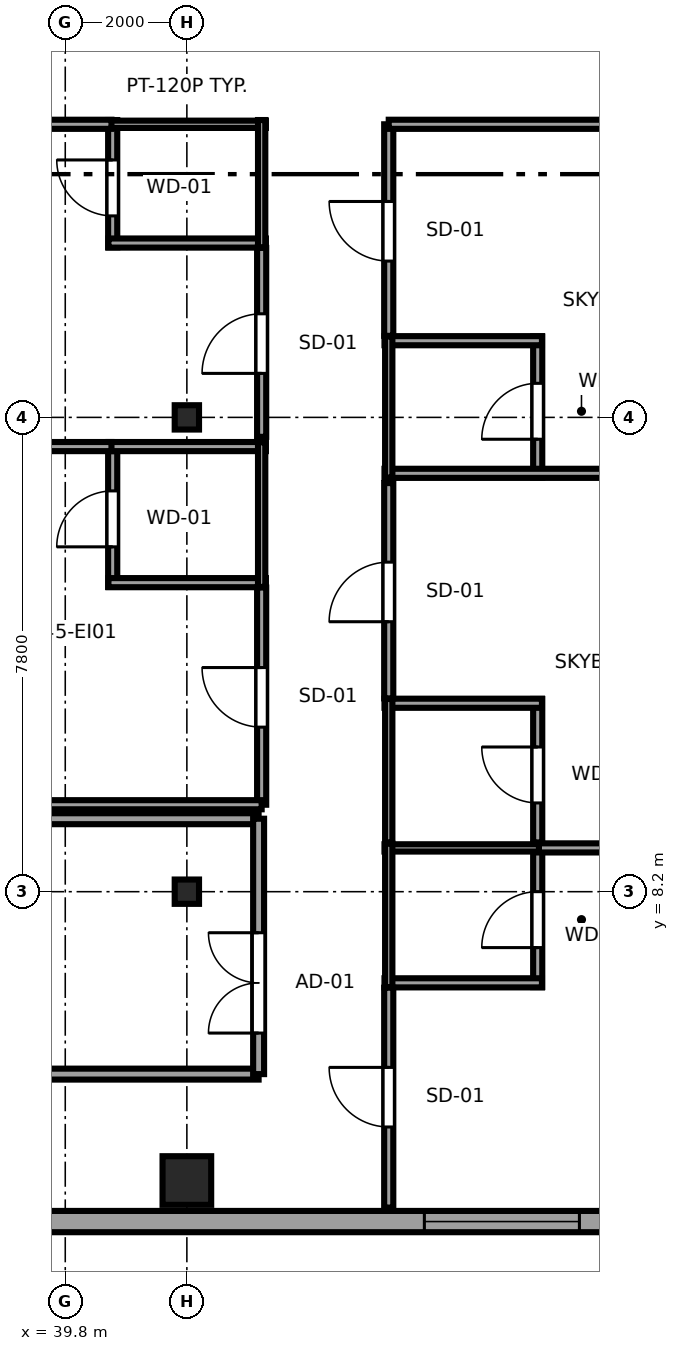
"""IFC4 building model, lengths in metres.
Left out: names, types, materials, properties, quantities, classifications, styles, units other than length and angle.
Written with IfcOpenShell. Run it as: python <this file> out.ifc"""

import sys

from ifc_helpers import new_model, si_unit, direction, frame, frame_2d, origin, origin_2d, place, context, subcontext, project, spatial, rectangle, i_section, extrude, source, transform, mapped, element, fill, save


model = new_model("IFC4")
c1 = context("Model", 3, precision=1e-05, world=origin(), true_north=direction((0.0, 1.0)))
c2 = subcontext(c1, "Body", "Model", "MODEL_VIEW")
j1 = project(units=[si_unit("LENGTHUNIT", "METRE"), si_unit("PLANEANGLEUNIT", "RADIAN")], contexts=[c1])
p1 = place(None, origin())
s1 = spatial("IfcSite", under=j1, at=p1, CompositionType="ELEMENT")
p2 = place(p1, origin())
s2 = spatial("IfcBuilding", under=s1, at=p2, CompositionType="ELEMENT")
p3 = place(p2, frame((0.0, 0.0, 171.9)))
s3 = spatial("IfcBuildingStorey", under=s2, at=p3, CompositionType="ELEMENT", Elevation=171.9)
m1 = source(origin(), c2, "Body", "SweptSolid", [
    extrude(rectangle(XDim=0.8, YDim=0.8, at=origin_2d()), origin(), (0.0, 0.0, 1.0), 3.55),
])
p4 = place(p3, frame((41.8, 3.45, 0.0), z_axis=(0.0, 0.0, 1.0), x_axis=(1.0, 0.0, 0.0)))
e1 = element("IfcColumn", 1, at=p4, inside=s3, PredefinedType="COLUMN", context=c2, shape_type="MappedRepresentation", body=[
    mapped(m1, transform((0.0, 0.0, 0.0), x_axis=(1.0, 0.0, 0.0), y_axis=(0.0, 1.0, 0.0), z_axis=(0.0, 0.0, 1.0), scale=1.0)),
])
m2 = source(origin(), c2, "Body", "SweptSolid", [
    extrude(i_section(OverallWidth=0.4, OverallDepth=0.4, WebThickness=0.02, FlangeThickness=0.035, at=origin_2d()), origin(), (0.0, 0.0, 1.0), 3.55),
])
for number, where, z_axis, x_axis in (
    (2, (41.8, 8.2, 0.0), (0.0, 0.0, 1.0), (1.0, 0.0, 0.0)),
    (3, (41.8, 16.0, 0.0), (0.0, 0.0, 1.0), (1.0, 0.0, 0.0)),
):
    element("IfcColumn", number, at=place(p3, frame(where, z_axis=z_axis, x_axis=x_axis)), inside=s3, PredefinedType="COLUMN", context=c2, shape_type="MappedRepresentation", body=[
        mapped(m2, transform((0.0, 0.0, 0.0), x_axis=(1.0, 0.0, 0.0), y_axis=(0.0, 1.0, 0.0), z_axis=(0.0, 0.0, 1.0), scale=1.0)),
    ])
p5 = place(p3, frame((34.375, 2.775, 0.0), z_axis=(0.0, 0.0, 1.0), x_axis=(1.0, 0.0, 0.0)))
e4 = element("IfcWall", 4, at=p5, inside=s3, PredefinedType="SOLIDWALL", context=c2, shape_type="SweptSolid", body=[
    extrude(rectangle(XDim=15.608, YDim=0.35, at=frame_2d((7.804, 0.0))), origin(), (0.0, 0.0, 1.0), 3.37),
])
p6 = place(p5, frame((1.726, 0.0, 0.68)))
e5 = element("IfcOpeningElement", 5, at=p6, cuts=e4, PredefinedType="OPENING", context=c2, shape_type="SweptSolid", body=[
    extrude(rectangle(XDim=2.55, YDim=1.92, at=frame_2d((1.275, 0.96))), frame((0.0, 0.185, 0.0), z_axis=(0.0, -1.0, 0.0), x_axis=(1.0, 0.0, 0.0)), (0.0, 0.0, 1.0), 0.37),
])
p7 = place(p5, frame((11.331, 0.0, 0.68)))
e6 = element("IfcOpeningElement", 6, at=p7, cuts=e4, PredefinedType="OPENING", context=c2, shape_type="SweptSolid", body=[
    extrude(rectangle(XDim=2.55, YDim=1.92, at=frame_2d((1.275, 0.96))), frame((0.0, 0.185, 0.0), z_axis=(0.0, -1.0, 0.0), x_axis=(1.0, 0.0, 0.0)), (0.0, 0.0, 1.0), 0.37),
])
p8 = place(p3, frame((40.58, 13.212, 0.0), z_axis=(0.0, 0.0, 1.0), x_axis=(0.0, 1.0, 0.0)))
e7 = element("IfcWall", 7, at=p8, inside=s3, PredefinedType="PARTITIONING", context=c2, shape_type="SweptSolid", body=[
    extrude(rectangle(XDim=2.378, YDim=0.15, at=frame_2d((1.189, 0.0))), origin(), (0.0, 0.0, 1.0), 3.37),
])
p9 = place(p8, frame((0.659, 0.0, 0.0)))
e8 = element("IfcOpeningElement", 8, at=p9, cuts=e7, PredefinedType="OPENING", context=c2, shape_type="SweptSolid", body=[
    extrude(rectangle(XDim=0.92, YDim=2.01, at=frame_2d((0.46, 1.005))), frame((0.0, 0.085, 0.0), z_axis=(0.0, -1.0, 0.0), x_axis=(1.0, 0.0, 0.0)), (0.0, 0.0, 1.0), 0.17),
])
for number, where, z_axis, x_axis in (
    (9, (40.51, 13.282, 0.0), (0.0, 0.0, 1.0), (1.0, 0.0, 0.0)),
    (10, (40.51, 15.52, 0.0), (0.0, 0.0, 1.0), (1.0, 0.0, 0.0)),
):
    element("IfcWall", number, at=place(p3, frame(where, z_axis=z_axis, x_axis=x_axis)), inside=s3, PredefinedType="PARTITIONING", context=c2, shape_type="SweptSolid", body=[
        extrude(rectangle(XDim=2.59, YDim=0.15, at=frame_2d((1.295, 0.0))), origin(), (0.0, 0.0, 1.0), 3.37),
    ])
p10 = place(p3, frame((43.03, 13.212, 0.0), z_axis=(0.0, 0.0, 1.0), x_axis=(0.0, 1.0, 0.0)))
e11 = element("IfcWall", 11, at=p10, inside=s3, PredefinedType="PLUMBINGWALL", context=c2, shape_type="SweptSolid", body=[
    extrude(rectangle(XDim=2.378, YDim=0.12, at=frame_2d((1.189, 0.0))), origin(), (0.0, 0.0, 1.0), 3.37),
])
p11 = place(p3, frame((40.58, 18.797, 0.0), z_axis=(0.0, 0.0, 1.0), x_axis=(0.0, 1.0, 0.0)))
e12 = element("IfcWall", 12, at=p11, inside=s3, PredefinedType="PARTITIONING", context=c2, shape_type="SweptSolid", body=[
    extrude(rectangle(XDim=2.093, YDim=0.15, at=frame_2d((1.046, 0.0))), origin(), (0.0, 0.0, 1.0), 3.37),
])
p12 = place(p11, frame((0.517, 0.0, 0.0)))
e13 = element("IfcOpeningElement", 13, at=p12, cuts=e12, PredefinedType="OPENING", context=c2, shape_type="SweptSolid", body=[
    extrude(rectangle(XDim=0.92, YDim=2.01, at=frame_2d((0.46, 1.005))), frame((0.0, 0.085, 0.0), z_axis=(0.0, -1.0, 0.0), x_axis=(1.0, 0.0, 0.0)), (0.0, 0.0, 1.0), 0.17),
])
p13 = place(p3, frame((40.51, 18.867, 0.0), z_axis=(0.0, 0.0, 1.0), x_axis=(1.0, 0.0, 0.0)))
e14 = element("IfcWall", 14, at=p13, inside=s3, PredefinedType="PARTITIONING", context=c2, shape_type="SweptSolid", body=[
    extrude(rectangle(XDim=2.59, YDim=0.15, at=frame_2d((1.295, 0.0))), origin(), (0.0, 0.0, 1.0), 3.37),
])
p14 = place(p3, frame((40.51, 20.82, 0.0), z_axis=(0.0, 0.0, 1.0), x_axis=(1.0, 0.0, 0.0)))
e15 = element("IfcWall", 15, at=p14, inside=s3, PredefinedType="PLUMBINGWALL", context=c2, shape_type="SweptSolid", body=[
    extrude(rectangle(XDim=2.59, YDim=0.12, at=frame_2d((1.295, 0.0))), origin(), (0.0, 0.0, 1.0), 3.37),
])
p15 = place(p3, frame((43.03, 18.797, 0.0), z_axis=(0.0, 0.0, 1.0), x_axis=(0.0, 1.0, 0.0)))
e16 = element("IfcWall", 16, at=p15, inside=s3, PredefinedType="PLUMBINGWALL", context=c2, shape_type="SweptSolid", body=[
    extrude(rectangle(XDim=2.093, YDim=0.12, at=frame_2d((1.046, 0.0))), origin(), (0.0, 0.0, 1.0), 3.37),
])
p16 = place(p3, frame((47.57, 6.631, 0.0), z_axis=(0.0, 0.0, 1.0), x_axis=(0.0, 1.0, 0.0)))
e17 = element("IfcWall", 17, at=p16, inside=s3, PredefinedType="PARTITIONING", context=c2, shape_type="SweptSolid", body=[
    extrude(rectangle(XDim=2.359, YDim=0.15, at=frame_2d((1.179, 0.0))), origin(), (0.0, 0.0, 1.0), 3.37),
])
p17 = place(p16, frame((0.649, 0.0, 0.0)))
e18 = element("IfcOpeningElement", 18, at=p17, cuts=e17, PredefinedType="OPENING", context=c2, shape_type="SweptSolid", body=[
    extrude(rectangle(XDim=0.92, YDim=2.01, at=frame_2d((0.46, 1.005))), frame((0.0, 0.085, 0.0), z_axis=(0.0, -1.0, 0.0), x_axis=(1.0, 0.0, 0.0)), (0.0, 0.0, 1.0), 0.17),
])
p18 = place(p3, frame((45.05, 6.701, 0.0), z_axis=(0.0, 0.0, 1.0), x_axis=(1.0, 0.0, 0.0)))
e19 = element("IfcWall", 19, at=p18, inside=s3, PredefinedType="PARTITIONING", context=c2, shape_type="SweptSolid", body=[
    extrude(rectangle(XDim=2.59, YDim=0.15, at=frame_2d((1.295, 0.0))), origin(), (0.0, 0.0, 1.0), 3.37),
])
p19 = place(p3, frame((45.05, 8.92, 0.0), z_axis=(0.0, 0.0, 1.0), x_axis=(1.0, 0.0, 0.0)))
e20 = element("IfcWall", 20, at=p19, inside=s3, PredefinedType="PLUMBINGWALL", context=c2, shape_type="SweptSolid", body=[
    extrude(rectangle(XDim=2.59, YDim=0.12, at=frame_2d((1.295, 0.0))), origin(), (0.0, 0.0, 1.0), 3.37),
])
p20 = place(p3, frame((45.12, 6.631, 0.0), z_axis=(0.0, 0.0, 1.0), x_axis=(0.0, 1.0, 0.0)))
e21 = element("IfcWall", 21, at=p20, inside=s3, PredefinedType="PLUMBINGWALL", context=c2, shape_type="SweptSolid", body=[
    extrude(rectangle(XDim=2.359, YDim=0.12, at=frame_2d((1.179, 0.0))), origin(), (0.0, 0.0, 1.0), 3.37),
])
p21 = place(p3, frame((47.57, 9.01, 0.0), z_axis=(0.0, 0.0, 1.0), x_axis=(0.0, 1.0, 0.0)))
e22 = element("IfcWall", 22, at=p21, inside=s3, PredefinedType="PARTITIONING", context=c2, shape_type="SweptSolid", body=[
    extrude(rectangle(XDim=2.359, YDim=0.15, at=frame_2d((1.179, 0.0))), origin(), (0.0, 0.0, 1.0), 3.37),
])
p22 = place(p21, frame((0.649, 0.0, 0.0)))
e23 = element("IfcOpeningElement", 23, at=p22, cuts=e22, PredefinedType="OPENING", context=c2, shape_type="SweptSolid", body=[
    extrude(rectangle(XDim=0.92, YDim=2.01, at=frame_2d((0.46, 1.005))), frame((0.0, 0.085, 0.0), z_axis=(0.0, -1.0, 0.0), x_axis=(1.0, 0.0, 0.0)), (0.0, 0.0, 1.0), 0.17),
])
p23 = place(p3, frame((45.05, 11.299, 0.0), z_axis=(0.0, 0.0, 1.0), x_axis=(1.0, 0.0, 0.0)))
e24 = element("IfcWall", 24, at=p23, inside=s3, PredefinedType="PARTITIONING", context=c2, shape_type="SweptSolid", body=[
    extrude(rectangle(XDim=2.59, YDim=0.15, at=frame_2d((1.295, 0.0))), origin(), (0.0, 0.0, 1.0), 3.37),
])
p24 = place(p3, frame((45.12, 9.01, 0.0), z_axis=(0.0, 0.0, 1.0), x_axis=(0.0, 1.0, 0.0)))
e25 = element("IfcWall", 25, at=p24, inside=s3, PredefinedType="PLUMBINGWALL", context=c2, shape_type="SweptSolid", body=[
    extrude(rectangle(XDim=2.359, YDim=0.12, at=frame_2d((1.179, 0.0))), origin(), (0.0, 0.0, 1.0), 3.37),
])
p25 = place(p3, frame((47.57, 15.01, 0.0), z_axis=(0.0, 0.0, 1.0), x_axis=(0.0, 1.0, 0.0)))
e26 = element("IfcWall", 26, at=p25, inside=s3, PredefinedType="PARTITIONING", context=c2, shape_type="SweptSolid", body=[
    extrude(rectangle(XDim=2.321, YDim=0.15, at=frame_2d((1.161, 0.0))), origin(), (0.0, 0.0, 1.0), 3.37),
])
p26 = place(p25, frame((0.631, 0.0, 0.0)))
e27 = element("IfcOpeningElement", 27, at=p26, cuts=e26, PredefinedType="OPENING", context=c2, shape_type="SweptSolid", body=[
    extrude(rectangle(XDim=0.92, YDim=2.01, at=frame_2d((0.46, 1.005))), frame((0.0, 0.085, 0.0), z_axis=(0.0, -1.0, 0.0), x_axis=(1.0, 0.0, 0.0)), (0.0, 0.0, 1.0), 0.17),
])
p27 = place(p3, frame((45.05, 15.08, 0.0), z_axis=(0.0, 0.0, 1.0), x_axis=(1.0, 0.0, 0.0)))
e28 = element("IfcWall", 28, at=p27, inside=s3, PredefinedType="PARTITIONING", context=c2, shape_type="SweptSolid", body=[
    extrude(rectangle(XDim=9.05, YDim=0.15, at=frame_2d((4.525, 0.0))), origin(), (0.0, 0.0, 1.0), 3.37),
])
p28 = place(p3, frame((45.05, 17.261, 0.0), z_axis=(0.0, 0.0, 1.0), x_axis=(1.0, 0.0, 0.0)))
e29 = element("IfcWall", 29, at=p28, inside=s3, PredefinedType="PARTITIONING", context=c2, shape_type="SweptSolid", body=[
    extrude(rectangle(XDim=2.59, YDim=0.15, at=frame_2d((1.295, 0.0))), origin(), (0.0, 0.0, 1.0), 3.37),
])
p29 = place(p3, frame((45.12, 15.01, 0.0), z_axis=(0.0, 0.0, 1.0), x_axis=(0.0, 1.0, 0.0)))
e30 = element("IfcWall", 30, at=p29, inside=s3, PredefinedType="PLUMBINGWALL", context=c2, shape_type="SweptSolid", body=[
    extrude(rectangle(XDim=2.321, YDim=0.12, at=frame_2d((1.161, 0.0))), origin(), (0.0, 0.0, 1.0), 3.37),
])
p30 = place(p3, frame((43.03, 9.63, 0.0), z_axis=(0.0, 0.0, 1.0), x_axis=(0.0, 1.0, 0.0)))
e31 = element("IfcWall", 31, at=p30, inside=s3, PredefinedType="PARTITIONING", context=c2, shape_type="SweptSolid", body=[
    extrude(rectangle(XDim=3.572, YDim=0.15, at=frame_2d((1.786, 0.0))), origin(), (0.0, 0.0, 1.0), 3.37),
])
p31 = place(p30, frame((1.276, 0.0, 0.0)))
e32 = element("IfcOpeningElement", 32, at=p31, cuts=e31, PredefinedType="OPENING", context=c2, shape_type="SweptSolid", body=[
    extrude(rectangle(XDim=0.98, YDim=2.12, at=frame_2d((0.49, 1.06))), frame((0.0, 0.085, 0.0), z_axis=(0.0, -1.0, 0.0), x_axis=(1.0, 0.0, 0.0)), (0.0, 0.0, 1.0), 0.17),
])
p32 = place(p3, frame((34.65, 9.63, 0.0), z_axis=(0.0, 0.0, 1.0), x_axis=(1.0, 0.0, 0.0)))
e33 = element("IfcWall", 33, at=p32, inside=s3, PredefinedType="PARTITIONING", context=c2, shape_type="SweptSolid", body=[
    extrude(rectangle(XDim=8.38, YDim=0.15, at=frame_2d((4.19, 0.0))), origin(), (0.0, 0.0, 1.0), 3.37),
])
p33 = place(p3, frame((34.65, 15.52, 0.0), z_axis=(0.0, 0.0, 1.0), x_axis=(1.0, 0.0, 0.0)))
e34 = element("IfcWall", 34, at=p33, inside=s3, PredefinedType="PARTITIONING", context=c2, shape_type="SweptSolid", body=[
    extrude(rectangle(XDim=5.91, YDim=0.15, at=frame_2d((2.955, 0.0))), origin(), (0.0, 0.0, 1.0), 3.37),
])
p34 = place(p3, frame((43.03, 15.68, 0.0), z_axis=(0.0, 0.0, 1.0), x_axis=(0.0, 1.0, 0.0)))
e35 = element("IfcWall", 35, at=p34, inside=s3, PredefinedType="PARTITIONING", context=c2, shape_type="SweptSolid", body=[
    extrude(rectangle(XDim=3.107, YDim=0.15, at=frame_2d((1.554, 0.0))), origin(), (0.0, 0.0, 1.0), 3.37),
])
p35 = place(p34, frame((1.043, 0.0, 0.0)))
e36 = element("IfcOpeningElement", 36, at=p35, cuts=e35, PredefinedType="OPENING", context=c2, shape_type="SweptSolid", body=[
    extrude(rectangle(XDim=0.98, YDim=2.12, at=frame_2d((0.49, 1.06))), frame((0.0, 0.085, 0.0), z_axis=(0.0, -1.0, 0.0), x_axis=(1.0, 0.0, 0.0)), (0.0, 0.0, 1.0), 0.17),
])
p36 = place(p3, frame((34.65, 20.82, 0.0), z_axis=(0.0, 0.0, 1.0), x_axis=(1.0, 0.0, 0.0)))
e37 = element("IfcWall", 37, at=p36, inside=s3, PredefinedType="PARTITIONING", context=c2, shape_type="SweptSolid", body=[
    extrude(rectangle(XDim=5.91, YDim=0.15, at=frame_2d((2.955, 0.0))), origin(), (0.0, 0.0, 1.0), 3.37),
])
p37 = place(p3, frame((45.12, 3.005, 0.0), z_axis=(0.0, 0.0, 1.0), x_axis=(0.0, 1.0, 0.0)))
e38 = element("IfcWall", 38, at=p37, inside=s3, PredefinedType="PARTITIONING", context=c2, shape_type="SweptSolid", body=[
    extrude(rectangle(XDim=3.616, YDim=0.15, at=frame_2d((1.808, 0.0))), origin(), (0.0, 0.0, 1.0), 3.37),
])
p38 = place(p37, frame((1.325, 0.0, 0.0)))
e39 = element("IfcOpeningElement", 39, at=p38, cuts=e38, PredefinedType="OPENING", context=c2, shape_type="SweptSolid", body=[
    extrude(rectangle(XDim=0.98, YDim=2.12, at=frame_2d((0.49, 1.06))), frame((0.0, 0.085, 0.0), z_axis=(0.0, -1.0, 0.0), x_axis=(1.0, 0.0, 0.0)), (0.0, 0.0, 1.0), 0.17),
])
p39 = place(p3, frame((47.59, 8.92, 0.0), z_axis=(0.0, 0.0, 1.0), x_axis=(1.0, 0.0, 0.0)))
e40 = element("IfcWall", 40, at=p39, inside=s3, PredefinedType="PARTITIONING", context=c2, shape_type="SweptSolid", body=[
    extrude(rectangle(XDim=6.51, YDim=0.15, at=frame_2d((3.255, 0.0))), origin(), (0.0, 0.0, 1.0), 3.37),
])
p40 = place(p3, frame((45.12, 11.379, 0.0), z_axis=(0.0, 0.0, 1.0), x_axis=(0.0, 1.0, 0.0)))
e41 = element("IfcWall", 41, at=p40, inside=s3, PredefinedType="PARTITIONING", context=c2, shape_type="SweptSolid", body=[
    extrude(rectangle(XDim=3.541, YDim=0.15, at=frame_2d((1.771, 0.0))), origin(), (0.0, 0.0, 1.0), 3.37),
])
p41 = place(p40, frame((1.26, 0.0, 0.0)))
e42 = element("IfcOpeningElement", 42, at=p41, cuts=e41, PredefinedType="OPENING", context=c2, shape_type="SweptSolid", body=[
    extrude(rectangle(XDim=0.98, YDim=2.12, at=frame_2d((0.49, 1.06))), frame((0.0, 0.085, 0.0), z_axis=(0.0, -1.0, 0.0), x_axis=(1.0, 0.0, 0.0)), (0.0, 0.0, 1.0), 0.17),
])
p42 = place(p3, frame((45.12, 17.341, 0.0), z_axis=(0.0, 0.0, 1.0), x_axis=(0.0, 1.0, 0.0)))
e43 = element("IfcWall", 43, at=p42, inside=s3, PredefinedType="PARTITIONING", context=c2, shape_type="SweptSolid", body=[
    extrude(rectangle(XDim=3.479, YDim=0.15, at=frame_2d((1.74, 0.0))), origin(), (0.0, 0.0, 1.0), 3.37),
])
p43 = place(p42, frame((1.229, 0.0, 0.0)))
e44 = element("IfcOpeningElement", 44, at=p43, cuts=e43, PredefinedType="OPENING", context=c2, shape_type="SweptSolid", body=[
    extrude(rectangle(XDim=0.98, YDim=2.12, at=frame_2d((0.49, 1.06))), frame((0.0, 0.085, 0.0), z_axis=(0.0, -1.0, 0.0), x_axis=(1.0, 0.0, 0.0)), (0.0, 0.0, 1.0), 0.17),
])
p44 = place(p3, frame((45.12, 20.82, 0.0), z_axis=(0.0, 0.0, 1.0), x_axis=(1.0, 0.0, 0.0)))
e45 = element("IfcWall", 45, at=p44, inside=s3, PredefinedType="PARTITIONING", context=c2, shape_type="SweptSolid", body=[
    extrude(rectangle(XDim=8.98, YDim=0.15, at=frame_2d((4.49, 0.0))), origin(), (0.0, 0.0, 1.0), 3.37),
])
for number, where, z_axis, x_axis in (
    (46, (14.47, 5.2, 0.0), (0.0, 0.0, 1.0), (1.0, 0.0, 0.0)),
    (47, (14.47, 9.4, 0.0), (0.0, 0.0, 1.0), (1.0, 0.0, 0.0)),
):
    element("IfcWall", number, at=place(p3, frame(where, z_axis=z_axis, x_axis=x_axis)), inside=s3, PredefinedType="PARTITIONING", context=c2, shape_type="SweptSolid", body=[
        extrude(rectangle(XDim=28.51, YDim=0.18, at=frame_2d((14.255, 0.0))), origin(), (0.0, 0.0, 1.0), 3.37),
    ])
p45 = place(p3, frame((42.98, 5.2, 0.0), z_axis=(0.0, 0.0, 1.0), x_axis=(0.0, 1.0, 0.0)))
e48 = element("IfcWall", 48, at=p45, inside=s3, PredefinedType="PARTITIONING", context=c2, shape_type="SweptSolid", body=[
    extrude(rectangle(XDim=4.2, YDim=0.18, at=frame_2d((2.1, 0.0))), origin(), (0.0, 0.0, 1.0), 3.37),
])
p46 = place(p45, frame((0.675, 0.0, 0.0)))
e49 = element("IfcOpeningElement", 49, at=p46, cuts=e48, PredefinedType="OPENING", context=c2, shape_type="SweptSolid", body=[
    extrude(rectangle(XDim=1.65, YDim=2.15, at=frame_2d((0.825, 1.075))), frame((0.0, 0.1, 0.0), z_axis=(0.0, -1.0, 0.0), x_axis=(1.0, 0.0, 0.0)), (0.0, 0.0, 1.0), 0.2),
])
m3 = source(origin(), c2, "Body", "SweptSolid", [
    extrude(rectangle(XDim=2.55, YDim=1.92, at=frame_2d((1.275, 0.96))), frame((0.0, 0.09, 0.0), z_axis=(0.0, -1.0, 0.0), x_axis=(1.0, 0.0, 0.0)), (0.0, 0.0, 1.0), 0.06),
])
p47 = place(p7, origin())
e50 = element("IfcWindow", 50, at=p47, inside=s3, PartitioningType="TRIPLE_PANEL_HORIZONTAL", PredefinedType="WINDOW", context=c2, shape_type="MappedRepresentation", body=[
    mapped(m3, transform((0.0, 0.0, 0.0), x_axis=(1.0, 0.0, 0.0), y_axis=(0.0, 1.0, 0.0), z_axis=(0.0, 0.0, 1.0), scale=1.0)),
])
fill(e6, e50)
m4 = source(origin(), c2, "Body", "SweptSolid", [
    extrude(rectangle(XDim=0.92, YDim=2.01, at=frame_2d((0.46, 1.005))), frame((0.0, 0.025, 0.0), z_axis=(0.0, -1.0, 0.0), x_axis=(1.0, 0.0, 0.0)), (0.0, 0.0, 1.0), 0.05),
])
p48 = place(p9, origin())
e51 = element("IfcDoor", 51, at=p48, inside=s3, OperationType="SINGLE_SWING_LEFT", PredefinedType="DOOR", context=c2, shape_type="MappedRepresentation", body=[
    mapped(m4, transform((0.0, 0.0, 0.0), x_axis=(1.0, 0.0, 0.0), y_axis=(0.0, 1.0, 0.0), z_axis=(0.0, 0.0, 1.0), scale=1.0)),
])
fill(e8, e51)
p49 = place(p12, origin())
e52 = element("IfcDoor", 52, at=p49, inside=s3, OperationType="SINGLE_SWING_RIGHT", PredefinedType="DOOR", context=c2, shape_type="MappedRepresentation", body=[
    mapped(m4, transform((0.0, 0.0, 0.0), x_axis=(1.0, 0.0, 0.0), y_axis=(0.0, 1.0, 0.0), z_axis=(0.0, 0.0, 1.0), scale=1.0)),
])
fill(e13, e52)
p50 = place(p17, origin())
e53 = element("IfcDoor", 53, at=p50, inside=s3, OperationType="SINGLE_SWING_LEFT", PredefinedType="DOOR", context=c2, shape_type="MappedRepresentation", body=[
    mapped(m4, transform((0.0, 0.0, 0.0), x_axis=(1.0, 0.0, 0.0), y_axis=(0.0, 1.0, 0.0), z_axis=(0.0, 0.0, 1.0), scale=1.0)),
])
fill(e18, e53)
p51 = place(p22, origin())
e54 = element("IfcDoor", 54, at=p51, inside=s3, OperationType="SINGLE_SWING_RIGHT", PredefinedType="DOOR", context=c2, shape_type="MappedRepresentation", body=[
    mapped(m4, transform((0.0, 0.0, 0.0), x_axis=(1.0, 0.0, 0.0), y_axis=(0.0, 1.0, 0.0), z_axis=(0.0, 0.0, 1.0), scale=1.0)),
])
fill(e23, e54)
p52 = place(p26, origin())
e55 = element("IfcDoor", 55, at=p52, inside=s3, OperationType="SINGLE_SWING_LEFT", PredefinedType="DOOR", context=c2, shape_type="MappedRepresentation", body=[
    mapped(m4, transform((0.0, 0.0, 0.0), x_axis=(1.0, 0.0, 0.0), y_axis=(0.0, 1.0, 0.0), z_axis=(0.0, 0.0, 1.0), scale=1.0)),
])
fill(e27, e55)
m5 = source(origin(), c2, "Body", "SweptSolid", [
    extrude(rectangle(XDim=0.98, YDim=2.12, at=frame_2d((0.49, 1.06))), frame((0.0, 0.025, 0.0), z_axis=(0.0, -1.0, 0.0), x_axis=(1.0, 0.0, 0.0)), (0.0, 0.0, 1.0), 0.05),
])
p53 = place(p31, origin())
e56 = element("IfcDoor", 56, at=p53, inside=s3, OperationType="SINGLE_SWING_RIGHT", PredefinedType="DOOR", context=c2, shape_type="MappedRepresentation", body=[
    mapped(m5, transform((0.0, 0.0, 0.0), x_axis=(1.0, 0.0, 0.0), y_axis=(0.0, 1.0, 0.0), z_axis=(0.0, 0.0, 1.0), scale=1.0)),
])
fill(e32, e56)
p54 = place(p35, origin())
e57 = element("IfcDoor", 57, at=p54, inside=s3, OperationType="SINGLE_SWING_LEFT", PredefinedType="DOOR", context=c2, shape_type="MappedRepresentation", body=[
    mapped(m5, transform((0.0, 0.0, 0.0), x_axis=(1.0, 0.0, 0.0), y_axis=(0.0, 1.0, 0.0), z_axis=(0.0, 0.0, 1.0), scale=1.0)),
])
fill(e36, e57)
p55 = place(p38, origin())
e58 = element("IfcDoor", 58, at=p55, inside=s3, OperationType="SINGLE_SWING_RIGHT", PredefinedType="DOOR", context=c2, shape_type="MappedRepresentation", body=[
    mapped(m5, transform((0.0, 0.0, 0.0), x_axis=(1.0, 0.0, 0.0), y_axis=(0.0, 1.0, 0.0), z_axis=(0.0, 0.0, 1.0), scale=1.0)),
])
fill(e39, e58)
p56 = place(p41, origin())
e59 = element("IfcDoor", 59, at=p56, inside=s3, OperationType="SINGLE_SWING_LEFT", PredefinedType="DOOR", context=c2, shape_type="MappedRepresentation", body=[
    mapped(m5, transform((0.0, 0.0, 0.0), x_axis=(1.0, 0.0, 0.0), y_axis=(0.0, 1.0, 0.0), z_axis=(0.0, 0.0, 1.0), scale=1.0)),
])
fill(e42, e59)
p57 = place(p43, origin())
e60 = element("IfcDoor", 60, at=p57, inside=s3, OperationType="SINGLE_SWING_RIGHT", PredefinedType="DOOR", context=c2, shape_type="MappedRepresentation", body=[
    mapped(m5, transform((0.0, 0.0, 0.0), x_axis=(1.0, 0.0, 0.0), y_axis=(0.0, 1.0, 0.0), z_axis=(0.0, 0.0, 1.0), scale=1.0)),
])
fill(e44, e60)
m6 = source(origin(), c2, "Body", "SweptSolid", [
    extrude(rectangle(XDim=1.65, YDim=2.15, at=frame_2d((0.825, 1.075))), frame((0.0, 0.025, 0.0), z_axis=(0.0, -1.0, 0.0), x_axis=(1.0, 0.0, 0.0)), (0.0, 0.0, 1.0), 0.05),
])
p58 = place(p46, origin())
e61 = element("IfcDoor", 61, at=p58, inside=s3, OperationType="DOUBLE_DOOR_SINGLE_SWING", PredefinedType="DOOR", context=c2, shape_type="MappedRepresentation", body=[
    mapped(m6, transform((0.0, 0.0, 0.0), x_axis=(1.0, 0.0, 0.0), y_axis=(0.0, 1.0, 0.0), z_axis=(0.0, 0.0, 1.0), scale=1.0)),
])
fill(e49, e61)
save(model, sys.argv[1])
